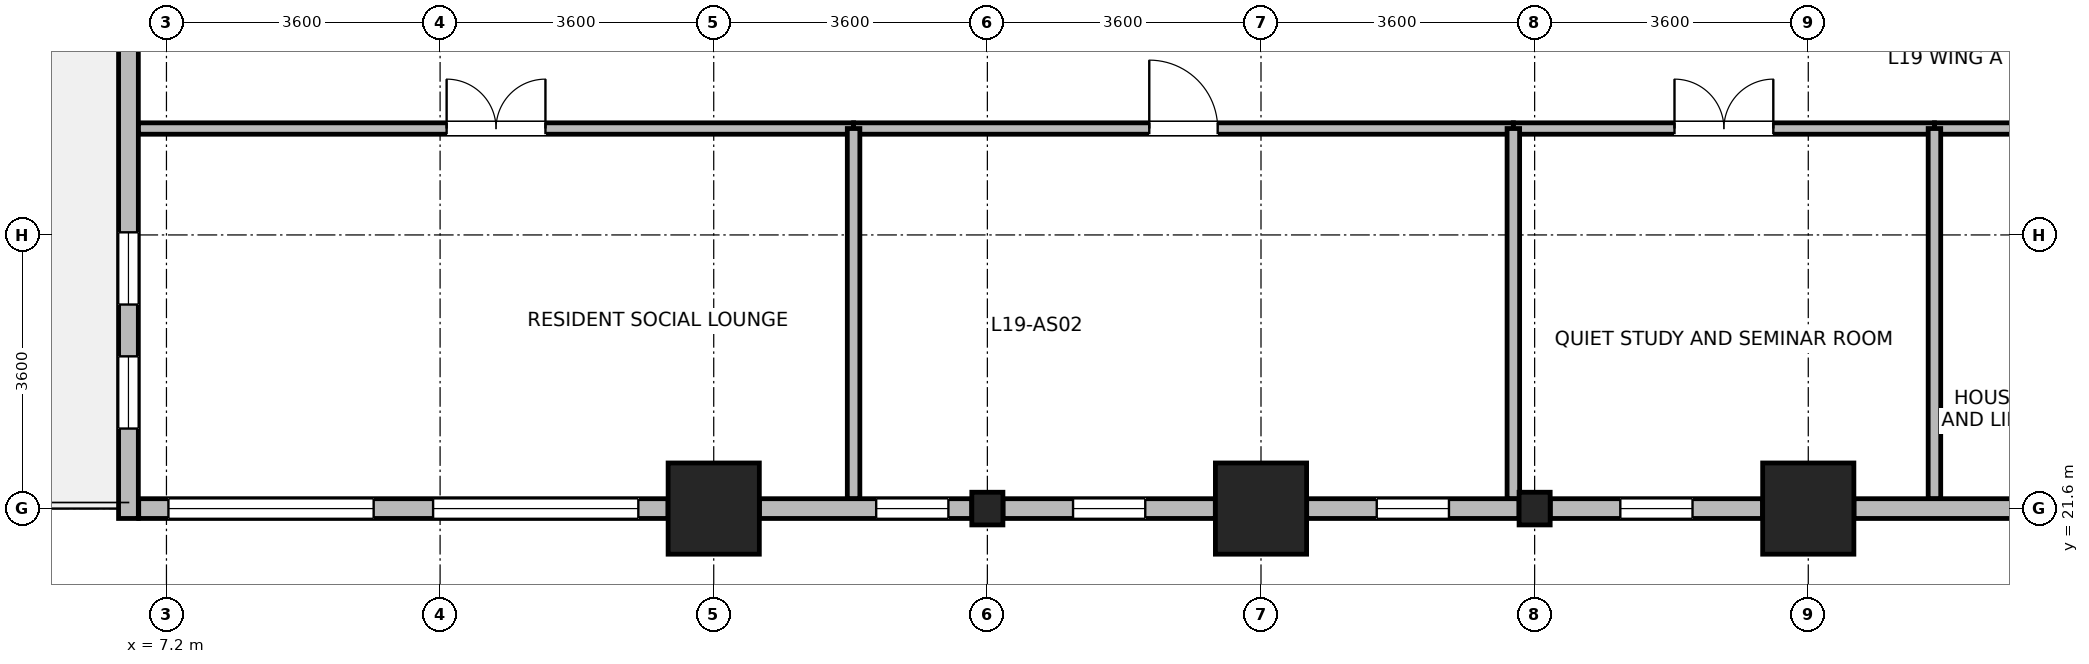
"""IFC4 building model, lengths in metres.
Left out: names, types, materials, properties, quantities, classifications, styles, units other than length and angle.
Written with IfcOpenShell. Run it as: python <this file> out.ifc"""

import sys

from ifc_helpers import new_model, si_unit, direction, frame, frame_2d, origin, origin_2d, place, context, subcontext, project, spatial, rectangle, i_section, extrude, source, transform, mapped, element, fill, save


model = new_model("IFC4")
c1 = context("Model", 3, precision=1e-05, world=origin(), true_north=direction((0.0, 1.0)))
c2 = subcontext(c1, "Body", "Model", "MODEL_VIEW")
j1 = project(units=[si_unit("LENGTHUNIT", "METRE"), si_unit("PLANEANGLEUNIT", "RADIAN")], contexts=[c1])
p1 = place(None, origin())
s1 = spatial("IfcSite", under=j1, at=p1, CompositionType="ELEMENT")
p2 = place(p1, origin())
s2 = spatial("IfcBuilding", under=s1, at=p2, CompositionType="ELEMENT")
p3 = place(p2, frame((0.0, 0.0, 78.6)))
s3 = spatial("IfcBuildingStorey", under=s2, at=p3, CompositionType="ELEMENT", Elevation=78.6)
m1 = source(origin(), c2, "Body", "SweptSolid", [
    extrude(rectangle(XDim=1.2, YDim=1.2, at=origin_2d()), origin(), (0.0, 0.0, 1.0), 3.7),
])
for number, where, z_axis, x_axis in (
    (1, (14.4, 21.6, 0.0), (0.0, 0.0, 1.0), (1.0, 0.0, 0.0)),
    (2, (21.6, 21.6, 0.0), (0.0, 0.0, 1.0), (1.0, 0.0, 0.0)),
    (3, (28.8, 21.6, 0.0), (0.0, 0.0, 1.0), (1.0, 0.0, 0.0)),
):
    element("IfcColumn", number, at=place(p3, frame(where, z_axis=z_axis, x_axis=x_axis)), inside=s3, PredefinedType="COLUMN", context=c2, shape_type="MappedRepresentation", body=[
        mapped(m1, transform((0.0, 0.0, 0.0), x_axis=(1.0, 0.0, 0.0), y_axis=(0.0, 1.0, 0.0), z_axis=(0.0, 0.0, 1.0), scale=1.0)),
    ])
m2 = source(origin(), c2, "Body", "SweptSolid", [
    extrude(i_section(OverallWidth=0.409, OverallDepth=0.43, WebThickness=0.024, FlangeThickness=0.033, FilletRadius=0.015, at=origin_2d()), origin(), (0.0, 0.0, 1.0), 3.7),
])
for number, where, z_axis, x_axis in (
    (4, (18.0, 21.6, 0.0), (0.0, 0.0, 1.0), (1.0, 0.0, 0.0)),
    (5, (25.2, 21.6, 0.0), (0.0, 0.0, 1.0), (1.0, 0.0, 0.0)),
):
    element("IfcColumn", number, at=place(p3, frame(where, z_axis=z_axis, x_axis=x_axis)), inside=s3, PredefinedType="COLUMN", context=c2, shape_type="MappedRepresentation", body=[
        mapped(m2, transform((0.0, 0.0, 0.0), x_axis=(1.0, 0.0, 0.0), y_axis=(0.0, 1.0, 0.0), z_axis=(0.0, 0.0, 1.0), scale=1.0)),
    ])
p4 = place(p3, frame((6.7, 21.47, 0.0), z_axis=(0.0, 0.0, 1.0), x_axis=(0.0, 1.0, 0.0)))
e6 = element("IfcWall", 6, at=p4, inside=s3, PredefinedType="STANDARD", context=c2, shape_type="SweptSolid", body=[
    extrude(rectangle(XDim=6.579, YDim=0.26, at=frame_2d((3.29, 0.0))), origin(), (0.0, 0.0, 1.0), 3.43),
])
p5 = place(p4, frame((2.814, 0.0, 0.85)))
e7 = element("IfcOpeningElement", 7, at=p5, cuts=e6, PredefinedType="OPENING", context=c2, shape_type="SweptSolid", body=[
    extrude(rectangle(XDim=0.95, YDim=1.75, at=frame_2d((0.475, 0.875))), frame((0.0, 0.14, 0.0), z_axis=(0.0, -1.0, 0.0), x_axis=(1.0, 0.0, 0.0)), (0.0, 0.0, 1.0), 0.28),
])
p6 = place(p4, frame((1.183, 0.0, 0.85)))
e8 = element("IfcOpeningElement", 8, at=p6, cuts=e6, PredefinedType="OPENING", context=c2, shape_type="SweptSolid", body=[
    extrude(rectangle(XDim=0.95, YDim=1.75, at=frame_2d((0.475, 0.875))), frame((0.0, 0.14, 0.0), z_axis=(0.0, -1.0, 0.0), x_axis=(1.0, 0.0, 0.0)), (0.0, 0.0, 1.0), 0.28),
])
p7 = place(p3, frame((13.799, 21.6, 0.0), z_axis=(0.0, 0.0, 1.0), x_axis=(-1.0, 0.0, 0.0)))
e9 = element("IfcWall", 9, at=p7, inside=s3, PredefinedType="STANDARD", context=c2, shape_type="SweptSolid", body=[
    extrude(rectangle(XDim=6.964, YDim=0.26, at=frame_2d((3.482, 0.0))), origin(), (0.0, 0.0, 1.0), 3.43),
])
p8 = place(p7, frame((0.391, 0.0, 0.85)))
e10 = element("IfcOpeningElement", 10, at=p8, cuts=e9, PredefinedType="OPENING", context=c2, shape_type="SweptSolid", body=[
    extrude(rectangle(XDim=2.7, YDim=2.05, at=frame_2d((1.35, 1.025))), frame((0.0, 0.14, 0.0), z_axis=(0.0, -1.0, 0.0), x_axis=(1.0, 0.0, 0.0)), (0.0, 0.0, 1.0), 0.28),
])
p9 = place(p7, frame((3.873, 0.0, 0.85)))
e11 = element("IfcOpeningElement", 11, at=p9, cuts=e9, PredefinedType="OPENING", context=c2, shape_type="SweptSolid", body=[
    extrude(rectangle(XDim=2.7, YDim=2.05, at=frame_2d((1.35, 1.025))), frame((0.0, 0.14, 0.0), z_axis=(0.0, -1.0, 0.0), x_axis=(1.0, 0.0, 0.0)), (0.0, 0.0, 1.0), 0.28),
])
p10 = place(p3, frame((17.794, 21.6, 0.0), z_axis=(0.0, 0.0, 1.0), x_axis=(-1.0, 0.0, 0.0)))
e12 = element("IfcWall", 12, at=p10, inside=s3, PredefinedType="STANDARD", context=c2, shape_type="SweptSolid", body=[
    extrude(rectangle(XDim=2.793, YDim=0.26, at=frame_2d((1.397, 0.0))), origin(), (0.0, 0.0, 1.0), 2.93),
])
p11 = place(p10, frame((0.307, 0.0, 0.85)))
e13 = element("IfcOpeningElement", 13, at=p11, cuts=e12, PredefinedType="OPENING", context=c2, shape_type="SweptSolid", body=[
    extrude(rectangle(XDim=0.95, YDim=1.75, at=frame_2d((0.475, 0.875))), frame((0.0, 0.14, 0.0), z_axis=(0.0, -1.0, 0.0), x_axis=(1.0, 0.0, 0.0)), (0.0, 0.0, 1.0), 0.28),
])
p12 = place(p3, frame((20.999, 21.6, 0.0), z_axis=(0.0, 0.0, 1.0), x_axis=(-1.0, 0.0, 0.0)))
e14 = element("IfcWall", 14, at=p12, inside=s3, PredefinedType="STANDARD", context=c2, shape_type="SweptSolid", body=[
    extrude(rectangle(XDim=2.793, YDim=0.26, at=frame_2d((1.397, 0.0))), origin(), (0.0, 0.0, 1.0), 2.93),
])
p13 = place(p12, frame((0.922, 0.0, 0.85)))
e15 = element("IfcOpeningElement", 15, at=p13, cuts=e14, PredefinedType="OPENING", context=c2, shape_type="SweptSolid", body=[
    extrude(rectangle(XDim=0.95, YDim=1.75, at=frame_2d((0.475, 0.875))), frame((0.0, 0.14, 0.0), z_axis=(0.0, -1.0, 0.0), x_axis=(1.0, 0.0, 0.0)), (0.0, 0.0, 1.0), 0.28),
])
p14 = place(p3, frame((24.994, 21.6, 0.0), z_axis=(0.0, 0.0, 1.0), x_axis=(-1.0, 0.0, 0.0)))
e16 = element("IfcWall", 16, at=p14, inside=s3, PredefinedType="STANDARD", context=c2, shape_type="SweptSolid", body=[
    extrude(rectangle(XDim=2.793, YDim=0.26, at=frame_2d((1.397, 0.0))), origin(), (0.0, 0.0, 1.0), 2.93),
])
p15 = place(p14, frame((0.922, 0.0, 0.85)))
e17 = element("IfcOpeningElement", 17, at=p15, cuts=e16, PredefinedType="OPENING", context=c2, shape_type="SweptSolid", body=[
    extrude(rectangle(XDim=0.95, YDim=1.75, at=frame_2d((0.475, 0.875))), frame((0.0, 0.14, 0.0), z_axis=(0.0, -1.0, 0.0), x_axis=(1.0, 0.0, 0.0)), (0.0, 0.0, 1.0), 0.28),
])
p16 = place(p3, frame((28.199, 21.6, 0.0), z_axis=(0.0, 0.0, 1.0), x_axis=(-1.0, 0.0, 0.0)))
e18 = element("IfcWall", 18, at=p16, inside=s3, PredefinedType="STANDARD", context=c2, shape_type="SweptSolid", body=[
    extrude(rectangle(XDim=2.793, YDim=0.26, at=frame_2d((1.397, 0.0))), origin(), (0.0, 0.0, 1.0), 2.93),
])
p17 = place(p16, frame((0.922, 0.0, 0.85)))
e19 = element("IfcOpeningElement", 19, at=p17, cuts=e18, PredefinedType="OPENING", context=c2, shape_type="SweptSolid", body=[
    extrude(rectangle(XDim=0.95, YDim=1.75, at=frame_2d((0.475, 0.875))), frame((0.0, 0.14, 0.0), z_axis=(0.0, -1.0, 0.0), x_axis=(1.0, 0.0, 0.0)), (0.0, 0.0, 1.0), 0.28),
])
p18 = place(p3, frame((31.765, 21.6, 0.0), z_axis=(0.0, 0.0, 1.0), x_axis=(-1.0, 0.0, 0.0)))
e20 = element("IfcWall", 20, at=p18, inside=s3, PredefinedType="STANDARD", context=c2, shape_type="SweptSolid", body=[
    extrude(rectangle(XDim=2.364, YDim=0.26, at=frame_2d((1.182, 0.0))), origin(), (0.0, 0.0, 1.0), 2.93),
])
p19 = place(p3, frame((6.832, 26.6, 0.0), z_axis=(0.0, 0.0, 1.0), x_axis=(1.0, 0.0, 0.0)))
e21 = element("IfcWall", 21, at=p19, inside=s3, PredefinedType="PARTITIONING", context=c2, shape_type="SweptSolid", body=[
    extrude(rectangle(XDim=9.408, YDim=0.15, at=frame_2d((4.704, 0.0))), origin(), (0.0, 0.0, 1.0), 3.43),
])
p20 = place(p19, frame((4.054, 0.0, 0.0)))
e22 = element("IfcOpeningElement", 22, at=p20, cuts=e21, PredefinedType="OPENING", context=c2, shape_type="SweptSolid", body=[
    extrude(rectangle(XDim=1.3, YDim=2.12, at=frame_2d((0.65, 1.06))), frame((0.0, 0.085, 0.0), z_axis=(0.0, -1.0, 0.0), x_axis=(1.0, 0.0, 0.0)), (0.0, 0.0, 1.0), 0.17),
])
p21 = place(p3, frame((16.24, 26.6, 0.0), z_axis=(0.0, 0.0, 1.0), x_axis=(1.0, 0.0, 0.0)))
e23 = element("IfcWall", 23, at=p21, inside=s3, PredefinedType="PARTITIONING", context=c2, shape_type="SweptSolid", body=[
    extrude(rectangle(XDim=8.68, YDim=0.15, at=frame_2d((4.34, 0.0))), origin(), (0.0, 0.0, 1.0), 3.43),
])
p22 = place(p21, frame((3.89, 0.0, 0.0)))
e24 = element("IfcOpeningElement", 24, at=p22, cuts=e23, PredefinedType="OPENING", context=c2, shape_type="SweptSolid", body=[
    extrude(rectangle(XDim=0.9, YDim=2.08, at=frame_2d((0.45, 1.04))), frame((0.0, 0.085, 0.0), z_axis=(0.0, -1.0, 0.0), x_axis=(1.0, 0.0, 0.0)), (0.0, 0.0, 1.0), 0.17),
])
p23 = place(p3, frame((24.92, 26.6, 0.0), z_axis=(0.0, 0.0, 1.0), x_axis=(1.0, 0.0, 0.0)))
e25 = element("IfcWall", 25, at=p23, inside=s3, PredefinedType="PARTITIONING", context=c2, shape_type="SweptSolid", body=[
    extrude(rectangle(XDim=5.54, YDim=0.15, at=frame_2d((2.77, 0.0))), origin(), (0.0, 0.0, 1.0), 3.43),
])
p24 = place(p23, frame((2.12, 0.0, 0.0)))
e26 = element("IfcOpeningElement", 26, at=p24, cuts=e25, PredefinedType="OPENING", context=c2, shape_type="SweptSolid", body=[
    extrude(rectangle(XDim=1.3, YDim=2.12, at=frame_2d((0.65, 1.06))), frame((0.0, 0.085, 0.0), z_axis=(0.0, -1.0, 0.0), x_axis=(1.0, 0.0, 0.0)), (0.0, 0.0, 1.0), 0.17),
])
p25 = place(p3, frame((30.46, 26.6, 0.0), z_axis=(0.0, 0.0, 1.0), x_axis=(1.0, 0.0, 0.0)))
e27 = element("IfcWall", 27, at=p25, inside=s3, PredefinedType="PARTITIONING", context=c2, shape_type="SweptSolid", body=[
    extrude(rectangle(XDim=2.9, YDim=0.15, at=frame_2d((1.45, 0.0))), origin(), (0.0, 0.0, 1.0), 3.43),
])
for number, where, z_axis, x_axis in (
    (28, (16.24, 21.732, 0.0), (0.0, 0.0, 1.0), (0.0, 1.0, 0.0)),
    (29, (24.92, 21.732, 0.0), (0.0, 0.0, 1.0), (0.0, 1.0, 0.0)),
    (30, (30.46, 21.732, 0.0), (0.0, 0.0, 1.0), (0.0, 1.0, 0.0)),
):
    element("IfcWall", number, at=place(p3, frame(where, z_axis=z_axis, x_axis=x_axis)), inside=s3, PredefinedType="PARTITIONING", context=c2, shape_type="SweptSolid", body=[
        extrude(rectangle(XDim=4.868, YDim=0.165, at=frame_2d((2.434, 0.0))), origin(), (0.0, 0.0, 1.0), 3.43),
    ])
p26 = place(p5, origin())
e31 = element("IfcWindow", 31, at=p26, inside=s3, PartitioningType="SINGLE_PANEL", PredefinedType="WINDOW", context=c2, shape_type="SweptSolid", body=[
    extrude(rectangle(XDim=0.95, YDim=1.75, at=frame_2d((0.475, 0.875))), frame((0.0, 0.03, 0.0), z_axis=(0.0, -1.0, 0.0), x_axis=(1.0, 0.0, 0.0)), (0.0, 0.0, 1.0), 0.06),
])
fill(e7, e31)
p27 = place(p6, origin())
e32 = element("IfcWindow", 32, at=p27, inside=s3, PartitioningType="SINGLE_PANEL", PredefinedType="WINDOW", context=c2, shape_type="SweptSolid", body=[
    extrude(rectangle(XDim=0.95, YDim=1.75, at=frame_2d((0.475, 0.875))), frame((0.0, 0.03, 0.0), z_axis=(0.0, -1.0, 0.0), x_axis=(1.0, 0.0, 0.0)), (0.0, 0.0, 1.0), 0.06),
])
fill(e8, e32)
p28 = place(p8, origin())
e33 = element("IfcWindow", 33, at=p28, inside=s3, PartitioningType="SINGLE_PANEL", PredefinedType="WINDOW", context=c2, shape_type="SweptSolid", body=[
    extrude(rectangle(XDim=2.7, YDim=2.05, at=frame_2d((1.35, 1.025))), frame((0.0, 0.03, 0.0), z_axis=(0.0, -1.0, 0.0), x_axis=(1.0, 0.0, 0.0)), (0.0, 0.0, 1.0), 0.06),
])
fill(e10, e33)
p29 = place(p9, origin())
e34 = element("IfcWindow", 34, at=p29, inside=s3, PartitioningType="SINGLE_PANEL", PredefinedType="WINDOW", context=c2, shape_type="SweptSolid", body=[
    extrude(rectangle(XDim=2.7, YDim=2.05, at=frame_2d((1.35, 1.025))), frame((0.0, 0.03, 0.0), z_axis=(0.0, -1.0, 0.0), x_axis=(1.0, 0.0, 0.0)), (0.0, 0.0, 1.0), 0.06),
])
fill(e11, e34)
p30 = place(p11, origin())
e35 = element("IfcWindow", 35, at=p30, inside=s3, PartitioningType="SINGLE_PANEL", PredefinedType="WINDOW", context=c2, shape_type="SweptSolid", body=[
    extrude(rectangle(XDim=0.95, YDim=1.75, at=frame_2d((0.475, 0.875))), frame((0.0, 0.03, 0.0), z_axis=(0.0, -1.0, 0.0), x_axis=(1.0, 0.0, 0.0)), (0.0, 0.0, 1.0), 0.06),
])
fill(e13, e35)
p31 = place(p13, origin())
e36 = element("IfcWindow", 36, at=p31, inside=s3, PartitioningType="SINGLE_PANEL", PredefinedType="WINDOW", context=c2, shape_type="SweptSolid", body=[
    extrude(rectangle(XDim=0.95, YDim=1.75, at=frame_2d((0.475, 0.875))), frame((0.0, 0.03, 0.0), z_axis=(0.0, -1.0, 0.0), x_axis=(1.0, 0.0, 0.0)), (0.0, 0.0, 1.0), 0.06),
])
fill(e15, e36)
p32 = place(p15, origin())
e37 = element("IfcWindow", 37, at=p32, inside=s3, PartitioningType="SINGLE_PANEL", PredefinedType="WINDOW", context=c2, shape_type="SweptSolid", body=[
    extrude(rectangle(XDim=0.95, YDim=1.75, at=frame_2d((0.475, 0.875))), frame((0.0, 0.03, 0.0), z_axis=(0.0, -1.0, 0.0), x_axis=(1.0, 0.0, 0.0)), (0.0, 0.0, 1.0), 0.06),
])
fill(e17, e37)
p33 = place(p17, origin())
e38 = element("IfcWindow", 38, at=p33, inside=s3, PartitioningType="SINGLE_PANEL", PredefinedType="WINDOW", context=c2, shape_type="SweptSolid", body=[
    extrude(rectangle(XDim=0.95, YDim=1.75, at=frame_2d((0.475, 0.875))), frame((0.0, 0.03, 0.0), z_axis=(0.0, -1.0, 0.0), x_axis=(1.0, 0.0, 0.0)), (0.0, 0.0, 1.0), 0.06),
])
fill(e19, e38)
p34 = place(p20, origin())
e39 = element("IfcDoor", 39, at=p34, inside=s3, OperationType="DOUBLE_DOOR_SINGLE_SWING", PredefinedType="DOOR", context=c2, shape_type="SweptSolid", body=[
    extrude(rectangle(XDim=1.3, YDim=2.12, at=frame_2d((0.65, 1.06))), frame((0.0, 0.025, 0.0), z_axis=(0.0, -1.0, 0.0), x_axis=(1.0, 0.0, 0.0)), (0.0, 0.0, 1.0), 0.05),
])
fill(e22, e39)
p35 = place(p22, origin())
e40 = element("IfcDoor", 40, at=p35, inside=s3, OperationType="SINGLE_SWING_LEFT", PredefinedType="DOOR", context=c2, shape_type="SweptSolid", body=[
    extrude(rectangle(XDim=0.9, YDim=2.08, at=frame_2d((0.45, 1.04))), frame((0.0, 0.025, 0.0), z_axis=(0.0, -1.0, 0.0), x_axis=(1.0, 0.0, 0.0)), (0.0, 0.0, 1.0), 0.05),
])
fill(e24, e40)
p36 = place(p24, origin())
e41 = element("IfcDoor", 41, at=p36, inside=s3, OperationType="DOUBLE_DOOR_SINGLE_SWING", PredefinedType="DOOR", context=c2, shape_type="SweptSolid", body=[
    extrude(rectangle(XDim=1.3, YDim=2.12, at=frame_2d((0.65, 1.06))), frame((0.0, 0.025, 0.0), z_axis=(0.0, -1.0, 0.0), x_axis=(1.0, 0.0, 0.0)), (0.0, 0.0, 1.0), 0.05),
])
fill(e26, e41)
save(model, sys.argv[1])
